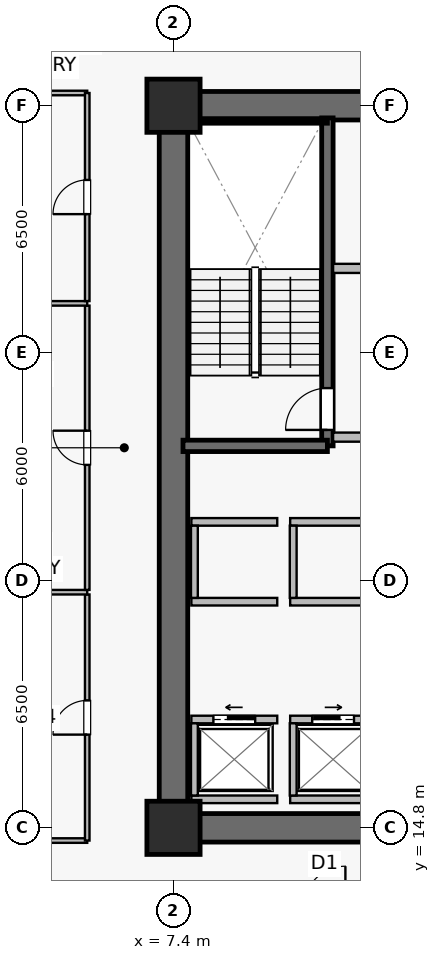
"""IFC4 building model, lengths in metres.
Left out: names, types, materials, properties, quantities, classifications, styles, units other than length and angle.
Written with IfcOpenShell. Run it as: python <this file> out.ifc"""

import sys

from ifc_helpers import new_model, si_unit, direction, frame, frame_2d, origin, origin_2d, place, context, subcontext, project, spatial, rectangle, extrude, source, transform, mapped, element, fill, save


model = new_model("IFC4")
c1 = context("Model", 3, precision=1e-05, world=origin(), true_north=direction((0.0, 1.0)))
c2 = subcontext(c1, "Body", "Model", "MODEL_VIEW")
j1 = project(units=[si_unit("LENGTHUNIT", "METRE"), si_unit("PLANEANGLEUNIT", "RADIAN")], contexts=[c1])
p1 = place(None, origin())
s1 = spatial("IfcSite", under=j1, at=p1, CompositionType="ELEMENT")
p2 = place(p1, origin())
s2 = spatial("IfcBuilding", under=s1, at=p2, CompositionType="ELEMENT")
p3 = place(p2, frame((0.0, 0.0, 62.1)))
s3 = spatial("IfcBuildingStorey", under=s2, at=p3, CompositionType="ELEMENT", Elevation=62.1)
p4 = place(p3, frame((7.025, 14.8, 0.0), z_axis=(0.0, 0.0, 1.0), x_axis=(1.0, 0.0, 0.0)))
e1 = element("IfcWall", 1, at=p4, inside=s3, PredefinedType="SHEAR", context=c2, shape_type="SweptSolid", body=[
    extrude(rectangle(XDim=15.55, YDim=0.75, at=frame_2d((7.775, 0.0))), origin(), (0.0, 0.0, 1.0), 3.78),
])
p5 = place(p3, frame((7.025, 33.8, 0.0), z_axis=(0.0, 0.0, 1.0), x_axis=(1.0, 0.0, 0.0)))
e2 = element("IfcWall", 2, at=p5, inside=s3, PredefinedType="SHEAR", context=c2, shape_type="SweptSolid", body=[
    extrude(rectangle(XDim=15.55, YDim=0.75, at=frame_2d((7.775, 0.0))), origin(), (0.0, 0.0, 1.0), 3.78),
])
p6 = place(p5, frame((5.725, 0.0, 0.0)))
e3 = element("IfcOpeningElement", 3, at=p6, cuts=e2, PredefinedType="OPENING", context=c2, shape_type="SweptSolid", body=[
    extrude(rectangle(XDim=0.95, YDim=2.15, at=frame_2d((0.475, 1.075))), frame((0.0, 0.385, 0.0), z_axis=(0.0, -1.0, 0.0), x_axis=(1.0, 0.0, 0.0)), (0.0, 0.0, 1.0), 0.77),
])
p7 = place(p5, frame((9.09, 0.0, 0.0)))
e4 = element("IfcOpeningElement", 4, at=p7, cuts=e2, PredefinedType="OPENING", context=c2, shape_type="SweptSolid", body=[
    extrude(rectangle(XDim=0.95, YDim=2.15, at=frame_2d((0.475, 1.075))), frame((0.0, 0.385, 0.0), z_axis=(0.0, -1.0, 0.0), x_axis=(1.0, 0.0, 0.0)), (0.0, 0.0, 1.0), 0.77),
])
p8 = place(p5, frame((12.49, 0.0, 0.0)))
e5 = element("IfcOpeningElement", 5, at=p8, cuts=e2, PredefinedType="OPENING", context=c2, shape_type="SweptSolid", body=[
    extrude(rectangle(XDim=0.95, YDim=2.15, at=frame_2d((0.475, 1.075))), frame((0.0, 0.385, 0.0), z_axis=(0.0, -1.0, 0.0), x_axis=(1.0, 0.0, 0.0)), (0.0, 0.0, 1.0), 0.77),
])
p9 = place(p3, frame((7.4, 15.175, 0.0), z_axis=(0.0, 0.0, 1.0), x_axis=(0.0, 1.0, 0.0)))
e6 = element("IfcWall", 6, at=p9, inside=s3, PredefinedType="SHEAR", context=c2, shape_type="SweptSolid", body=[
    extrude(rectangle(XDim=18.25, YDim=0.75, at=frame_2d((9.125, 0.0))), origin(), (0.0, 0.0, 1.0), 3.78),
])
p10 = place(p3, frame((11.45, 24.85, 0.0), z_axis=(0.0, 0.0, 1.0), x_axis=(0.0, 1.0, 0.0)))
e7 = element("IfcWall", 7, at=p10, inside=s3, PredefinedType="SHEAR", context=c2, shape_type="SweptSolid", body=[
    extrude(rectangle(XDim=8.63, YDim=0.3, at=frame_2d((4.315, 0.0))), origin(), (0.0, 0.0, 1.0), 3.78),
])
p11 = place(p10, frame((0.42, 0.0, 0.0)))
e8 = element("IfcOpeningElement", 8, at=p11, cuts=e7, PredefinedType="OPENING", context=c2, shape_type="SweptSolid", body=[
    extrude(rectangle(XDim=1.1, YDim=2.15, at=frame_2d((0.55, 1.075))), frame((0.0, 0.16, 0.0), z_axis=(0.0, -1.0, 0.0), x_axis=(1.0, 0.0, 0.0)), (0.0, 0.0, 1.0), 0.32),
])
p12 = place(p3, frame((7.65, 24.85, 0.0), z_axis=(0.0, 0.0, 1.0), x_axis=(1.0, 0.0, 0.0)))
e9 = element("IfcWall", 9, at=p12, inside=s3, PredefinedType="SHEAR", context=c2, shape_type="SweptSolid", body=[
    extrude(rectangle(XDim=3.8, YDim=0.3, at=frame_2d((1.9, 0.0))), origin(), (0.0, 0.0, 1.0), 3.78),
])
p13 = place(p3, frame((7.73, 33.4, 0.0), z_axis=(0.0, 0.0, 1.0), x_axis=(1.0, 0.0, 0.0)))
e10 = element("IfcWall", 10, at=p13, inside=s3, PredefinedType="SOLIDWALL", context=c2, shape_type="SweptSolid", body=[
    extrude(rectangle(XDim=3.72, YDim=0.12, at=frame_2d((1.86, 0.0))), origin(), (0.0, 0.0, 1.0), 3.78),
])
m1 = source(origin(), c2, "Body", "SweptSolid", [
    extrude(rectangle(XDim=1.4, YDim=1.4, at=origin_2d()), origin(), (0.0, 0.0, 1.0), 4.1),
])
for number, where, z_axis, x_axis in (
    (11, (7.4, 14.8, 0.0), (0.0, 0.0, 1.0), (1.0, 0.0, 0.0)),
    (12, (7.4, 33.8, 0.0), (0.0, 0.0, 1.0), (1.0, 0.0, 0.0)),
):
    element("IfcColumn", number, at=place(p3, frame(where, z_axis=z_axis, x_axis=x_axis)), inside=s3, PredefinedType="COLUMN", context=c2, shape_type="MappedRepresentation", body=[
        mapped(m1, transform((0.0, 0.0, 0.0), scale=1.0)),
    ])
p14 = place(p3, frame((11.6, 25.08, 0.0), z_axis=(0.0, 0.0, 1.0), x_axis=(1.0, 0.0, 0.0)))
e13 = element("IfcWall", 13, at=p14, inside=s3, PredefinedType="SOLIDWALL", context=c2, shape_type="SweptSolid", body=[
    extrude(rectangle(XDim=6.92, YDim=0.24, at=frame_2d((3.46, 0.0))), origin(), (0.0, 0.0, 1.0), 3.115),
])
p15 = place(p14, frame((2.6, 0.0, 0.0)))
e14 = element("IfcOpeningElement", 14, at=p15, cuts=e13, PredefinedType="OPENING", context=c2, shape_type="SweptSolid", body=[
    extrude(rectangle(XDim=1.2, YDim=2.16, at=frame_2d((0.6, 1.08))), frame((0.0, 0.13, 0.0), z_axis=(0.0, -1.0, 0.0), x_axis=(1.0, 0.0, 0.0)), (0.0, 0.0, 1.0), 0.26),
])
p16 = place(p3, frame((11.6, 29.52, 0.0), z_axis=(0.0, 0.0, 1.0), x_axis=(1.0, 0.0, 0.0)))
e15 = element("IfcWall", 15, at=p16, inside=s3, PredefinedType="SOLIDWALL", context=c2, shape_type="SweptSolid", body=[
    extrude(rectangle(XDim=6.92, YDim=0.24, at=frame_2d((3.46, 0.0))), origin(), (0.0, 0.0, 1.0), 3.115),
])
p17 = place(p3, frame((7.87, 17.65, 0.0), z_axis=(0.0, 0.0, 1.0), x_axis=(1.0, 0.0, 0.0)))
e16 = element("IfcWall", 16, at=p17, inside=s3, PredefinedType="SOLIDWALL", context=c2, shape_type="SweptSolid", body=[
    extrude(rectangle(XDim=2.26, YDim=0.2, at=frame_2d((1.13, 0.0))), origin(), (0.0, 0.0, 1.0), 3.78),
])
p18 = place(p17, frame((0.58, 0.0, 0.0)))
e17 = element("IfcOpeningElement", 17, at=p18, cuts=e16, PredefinedType="OPENING", context=c2, shape_type="SweptSolid", body=[
    extrude(rectangle(XDim=1.1, YDim=2.22, at=frame_2d((0.55, 1.11))), frame((0.0, 0.11, 0.0), z_axis=(0.0, -1.0, 0.0), x_axis=(1.0, 0.0, 0.0)), (0.0, 0.0, 1.0), 0.22),
])
p19 = place(p3, frame((7.87, 15.55, 0.0), z_axis=(0.0, 0.0, 1.0), x_axis=(1.0, 0.0, 0.0)))
e18 = element("IfcWall", 18, at=p19, inside=s3, PredefinedType="SOLIDWALL", context=c2, shape_type="SweptSolid", body=[
    extrude(rectangle(XDim=2.26, YDim=0.2, at=frame_2d((1.13, 0.0))), origin(), (0.0, 0.0, 1.0), 3.78),
])
p20 = place(p3, frame((7.95, 15.65, 0.0), z_axis=(0.0, 0.0, 1.0), x_axis=(0.0, 1.0, 0.0)))
e19 = element("IfcWall", 19, at=p20, inside=s3, PredefinedType="SOLIDWALL", context=c2, shape_type="SweptSolid", body=[
    extrude(rectangle(XDim=1.9, YDim=0.18, at=frame_2d((0.95, 0.0))), origin(), (0.0, 0.0, 1.0), 3.78),
])
p21 = place(p3, frame((10.47, 17.65, 0.0), z_axis=(0.0, 0.0, 1.0), x_axis=(1.0, 0.0, 0.0)))
e20 = element("IfcWall", 20, at=p21, inside=s3, PredefinedType="SOLIDWALL", context=c2, shape_type="SweptSolid", body=[
    extrude(rectangle(XDim=2.26, YDim=0.2, at=frame_2d((1.13, 0.0))), origin(), (0.0, 0.0, 1.0), 3.78),
])
p22 = place(p21, frame((0.58, 0.0, 0.0)))
e21 = element("IfcOpeningElement", 21, at=p22, cuts=e20, PredefinedType="OPENING", context=c2, shape_type="SweptSolid", body=[
    extrude(rectangle(XDim=1.1, YDim=2.22, at=frame_2d((0.55, 1.11))), frame((0.0, 0.11, 0.0), z_axis=(0.0, -1.0, 0.0), x_axis=(1.0, 0.0, 0.0)), (0.0, 0.0, 1.0), 0.22),
])
p23 = place(p3, frame((10.47, 15.55, 0.0), z_axis=(0.0, 0.0, 1.0), x_axis=(1.0, 0.0, 0.0)))
e22 = element("IfcWall", 22, at=p23, inside=s3, PredefinedType="SOLIDWALL", context=c2, shape_type="SweptSolid", body=[
    extrude(rectangle(XDim=2.26, YDim=0.2, at=frame_2d((1.13, 0.0))), origin(), (0.0, 0.0, 1.0), 3.78),
])
p24 = place(p3, frame((10.55, 15.65, 0.0), z_axis=(0.0, 0.0, 1.0), x_axis=(0.0, 1.0, 0.0)))
e23 = element("IfcWall", 23, at=p24, inside=s3, PredefinedType="SOLIDWALL", context=c2, shape_type="SweptSolid", body=[
    extrude(rectangle(XDim=1.9, YDim=0.18, at=frame_2d((0.95, 0.0))), origin(), (0.0, 0.0, 1.0), 3.78),
])
for number, where, z_axis, x_axis in (
    (24, (7.87, 20.75, 0.0), (0.0, 0.0, 1.0), (1.0, 0.0, 0.0)),
    (25, (7.87, 22.85, 0.0), (0.0, 0.0, 1.0), (1.0, 0.0, 0.0)),
):
    element("IfcWall", number, at=place(p3, frame(where, z_axis=z_axis, x_axis=x_axis)), inside=s3, PredefinedType="SOLIDWALL", context=c2, shape_type="SweptSolid", body=[
        extrude(rectangle(XDim=2.26, YDim=0.2, at=frame_2d((1.13, 0.0))), origin(), (0.0, 0.0, 1.0), 3.78),
    ])
p25 = place(p3, frame((7.95, 20.85, 0.0), z_axis=(0.0, 0.0, 1.0), x_axis=(0.0, 1.0, 0.0)))
e26 = element("IfcWall", 26, at=p25, inside=s3, PredefinedType="SOLIDWALL", context=c2, shape_type="SweptSolid", body=[
    extrude(rectangle(XDim=1.9, YDim=0.18, at=frame_2d((0.95, 0.0))), origin(), (0.0, 0.0, 1.0), 3.78),
])
for number, where, z_axis, x_axis in (
    (27, (10.47, 20.75, 0.0), (0.0, 0.0, 1.0), (1.0, 0.0, 0.0)),
    (28, (10.47, 22.85, 0.0), (0.0, 0.0, 1.0), (1.0, 0.0, 0.0)),
):
    element("IfcWall", number, at=place(p3, frame(where, z_axis=z_axis, x_axis=x_axis)), inside=s3, PredefinedType="SOLIDWALL", context=c2, shape_type="SweptSolid", body=[
        extrude(rectangle(XDim=2.26, YDim=0.2, at=frame_2d((1.13, 0.0))), origin(), (0.0, 0.0, 1.0), 3.78),
    ])
p26 = place(p3, frame((10.55, 20.85, 0.0), z_axis=(0.0, 0.0, 1.0), x_axis=(0.0, 1.0, 0.0)))
e29 = element("IfcWall", 29, at=p26, inside=s3, PredefinedType="SOLIDWALL", context=c2, shape_type="SweptSolid", body=[
    extrude(rectangle(XDim=1.9, YDim=0.18, at=frame_2d((0.95, 0.0))), origin(), (0.0, 0.0, 1.0), 3.78),
])
for number, where, z_axis, x_axis in (
    (30, (0.11, 14.465, 0.0), (0.0, 0.0, 1.0), (1.0, 0.0, 0.0)),
    (31, (0.11, 34.135, 0.0), (0.0, 0.0, 1.0), (1.0, 0.0, 0.0)),
):
    element("IfcWall", number, at=place(p3, frame(where, z_axis=z_axis, x_axis=x_axis)), inside=s3, PredefinedType="PARTITIONING", context=c2, shape_type="SweptSolid", body=[
        extrude(rectangle(XDim=5.02, YDim=0.12, at=frame_2d((2.51, 0.0))), origin(), (0.0, 0.0, 1.0), 3.78),
    ])
p27 = place(p3, frame((5.13, 14.465, 0.0), z_axis=(0.0, 0.0, 1.0), x_axis=(0.0, 1.0, 0.0)))
e32 = element("IfcWall", 32, at=p27, inside=s3, PredefinedType="PARTITIONING", context=c2, shape_type="SweptSolid", body=[
    extrude(rectangle(XDim=6.475, YDim=0.12, at=frame_2d((3.237, 0.0))), origin(), (0.0, 0.0, 1.0), 3.78),
])
p28 = place(p27, frame((2.788, 0.0, 0.0)))
e33 = element("IfcOpeningElement", 33, at=p28, cuts=e32, PredefinedType="OPENING", context=c2, shape_type="SweptSolid", body=[
    extrude(rectangle(XDim=0.9, YDim=2.1, at=frame_2d((0.45, 1.05))), frame((0.0, 0.07, 0.0), z_axis=(0.0, -1.0, 0.0), x_axis=(1.0, 0.0, 0.0)), (0.0, 0.0, 1.0), 0.14),
])
p29 = place(p3, frame((0.11, 21.0, 0.0), z_axis=(0.0, 0.0, 1.0), x_axis=(1.0, 0.0, 0.0)))
e34 = element("IfcWall", 34, at=p29, inside=s3, PredefinedType="PARTITIONING", context=c2, shape_type="SweptSolid", body=[
    extrude(rectangle(XDim=5.02, YDim=0.12, at=frame_2d((2.51, 0.0))), origin(), (0.0, 0.0, 1.0), 3.78),
])
p30 = place(p3, frame((5.13, 21.06, 0.0), z_axis=(0.0, 0.0, 1.0), x_axis=(0.0, 1.0, 0.0)))
e35 = element("IfcWall", 35, at=p30, inside=s3, PredefinedType="PARTITIONING", context=c2, shape_type="SweptSolid", body=[
    extrude(rectangle(XDim=7.48, YDim=0.12, at=frame_2d((3.74, 0.0))), origin(), (0.0, 0.0, 1.0), 3.78),
])
p31 = place(p30, frame((3.29, 0.0, 0.0)))
e36 = element("IfcOpeningElement", 36, at=p31, cuts=e35, PredefinedType="OPENING", context=c2, shape_type="SweptSolid", body=[
    extrude(rectangle(XDim=0.9, YDim=2.1, at=frame_2d((0.45, 1.05))), frame((0.0, 0.07, 0.0), z_axis=(0.0, -1.0, 0.0), x_axis=(1.0, 0.0, 0.0)), (0.0, 0.0, 1.0), 0.14),
])
p32 = place(p3, frame((0.11, 28.6, 0.0), z_axis=(0.0, 0.0, 1.0), x_axis=(1.0, 0.0, 0.0)))
e37 = element("IfcWall", 37, at=p32, inside=s3, PredefinedType="PARTITIONING", context=c2, shape_type="SweptSolid", body=[
    extrude(rectangle(XDim=5.02, YDim=0.12, at=frame_2d((2.51, 0.0))), origin(), (0.0, 0.0, 1.0), 3.78),
])
p33 = place(p3, frame((5.13, 28.66, 0.0), z_axis=(0.0, 0.0, 1.0), x_axis=(0.0, 1.0, 0.0)))
e38 = element("IfcWall", 38, at=p33, inside=s3, PredefinedType="PARTITIONING", context=c2, shape_type="SweptSolid", body=[
    extrude(rectangle(XDim=5.475, YDim=0.12, at=frame_2d((2.738, 0.0))), origin(), (0.0, 0.0, 1.0), 3.78),
])
p34 = place(p33, frame((2.288, 0.0, 0.0)))
e39 = element("IfcOpeningElement", 39, at=p34, cuts=e38, PredefinedType="OPENING", context=c2, shape_type="SweptSolid", body=[
    extrude(rectangle(XDim=0.9, YDim=2.1, at=frame_2d((0.45, 1.05))), frame((0.0, 0.07, 0.0), z_axis=(0.0, -1.0, 0.0), x_axis=(1.0, 0.0, 0.0)), (0.0, 0.0, 1.0), 0.14),
])
m2 = source(origin(), c2, "Body", "SweptSolid", [
    extrude(rectangle(XDim=1.1, YDim=2.15, at=frame_2d((0.55, 1.075))), frame((0.0, 0.025, 0.0), z_axis=(0.0, -1.0, 0.0), x_axis=(1.0, 0.0, 0.0)), (0.0, 0.0, 1.0), 0.05),
])
p35 = place(p11, origin())
e40 = element("IfcDoor", 40, at=p35, inside=s3, OperationType="SINGLE_SWING_LEFT", PredefinedType="DOOR", context=c2, shape_type="MappedRepresentation", body=[
    mapped(m2, transform((0.0, 0.0, 0.0), scale=1.0)),
])
fill(e8, e40)
m3 = source(origin(), c2, "Body", "SweptSolid", [
    extrude(rectangle(XDim=1.1, YDim=2.22, at=frame_2d((0.55, 1.11))), frame((0.0, 0.025, 0.0), z_axis=(0.0, -1.0, 0.0), x_axis=(1.0, 0.0, 0.0)), (0.0, 0.0, 1.0), 0.05),
])
p36 = place(p18, origin())
e41 = element("IfcDoor", 41, at=p36, inside=s3, OperationType="SLIDING_TO_LEFT", PredefinedType="USERDEFINED", context=c2, shape_type="MappedRepresentation", body=[
    mapped(m3, transform((0.0, 0.0, 0.0), scale=1.0)),
])
fill(e17, e41)
p37 = place(p22, origin())
e42 = element("IfcDoor", 42, at=p37, inside=s3, OperationType="SLIDING_TO_RIGHT", PredefinedType="USERDEFINED", context=c2, shape_type="MappedRepresentation", body=[
    mapped(m3, transform((0.0, 0.0, 0.0), scale=1.0)),
])
fill(e21, e42)
m4 = source(origin(), c2, "Body", "SweptSolid", [
    extrude(rectangle(XDim=0.9, YDim=2.1, at=frame_2d((0.45, 1.05))), frame((0.0, 0.025, 0.0), z_axis=(0.0, -1.0, 0.0), x_axis=(1.0, 0.0, 0.0)), (0.0, 0.0, 1.0), 0.05),
])
p38 = place(p28, origin())
e43 = element("IfcDoor", 43, at=p38, inside=s3, OperationType="SINGLE_SWING_LEFT", PredefinedType="DOOR", context=c2, shape_type="MappedRepresentation", body=[
    mapped(m4, transform((0.0, 0.0, 0.0), scale=1.0)),
])
fill(e33, e43)
p39 = place(p31, origin())
e44 = element("IfcDoor", 44, at=p39, inside=s3, OperationType="SINGLE_SWING_RIGHT", PredefinedType="DOOR", context=c2, shape_type="MappedRepresentation", body=[
    mapped(m4, transform((0.0, 0.0, 0.0), scale=1.0)),
])
fill(e36, e44)
p40 = place(p34, origin())
e45 = element("IfcDoor", 45, at=p40, inside=s3, OperationType="SINGLE_SWING_LEFT", PredefinedType="DOOR", context=c2, shape_type="MappedRepresentation", body=[
    mapped(m4, transform((0.0, 0.0, 0.0), scale=1.0)),
])
fill(e39, e45)
save(model, sys.argv[1])
